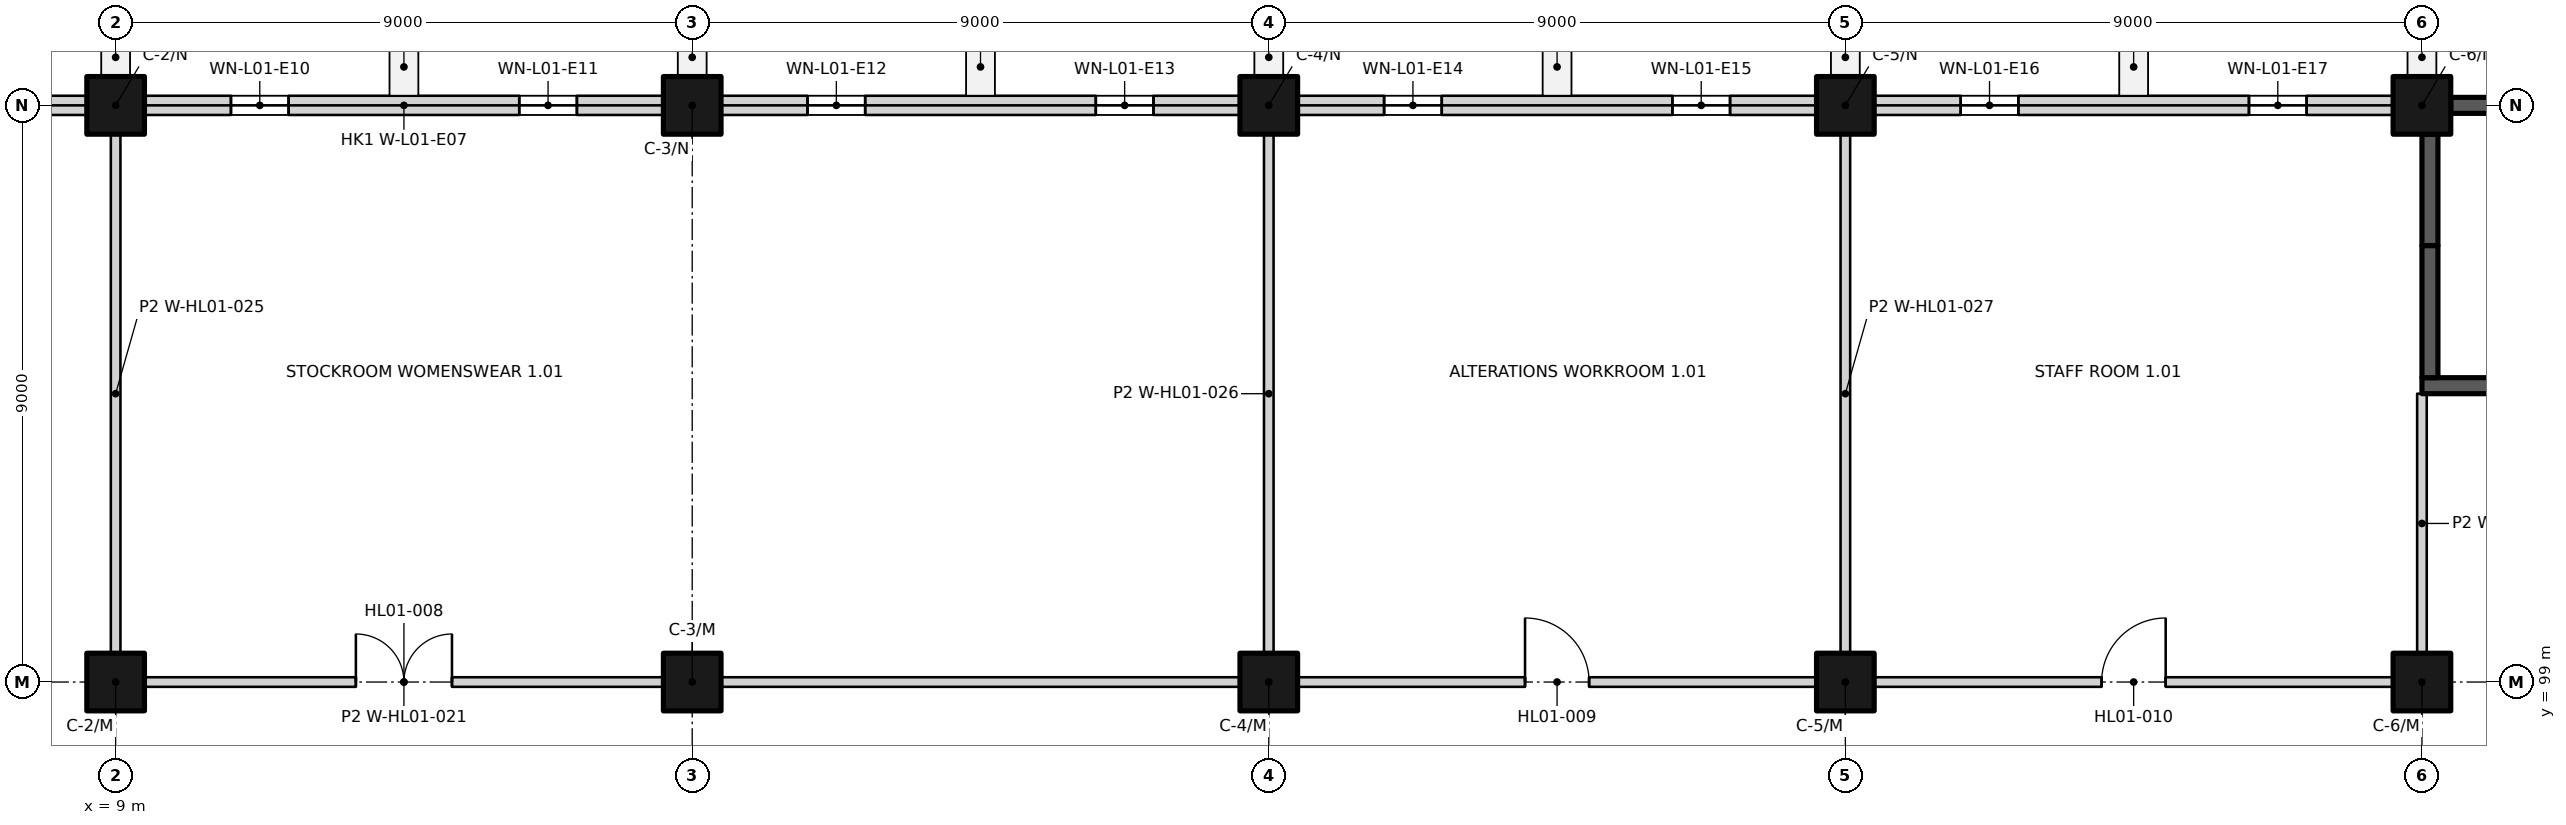
"""IFC4 building model, lengths in metres.
Left out: names, types, materials, properties, quantities, classifications, styles, units other than length and angle.
Written with IfcOpenShell. Run it as: python <this file> out.ifc"""

import sys

from ifc_helpers import new_model, si_unit, direction, frame, frame_2d, origin, origin_2d, place, context, subcontext, project, spatial, rectangle, extrude, element, fill, save


model = new_model("IFC4")
c1 = context("Model", 3, precision=1e-05, world=origin(), true_north=direction((0.0, 1.0)))
c2 = subcontext(c1, "Body", "Model", "MODEL_VIEW")
j1 = project(units=[si_unit("LENGTHUNIT", "METRE"), si_unit("PLANEANGLEUNIT", "RADIAN")], contexts=[c1])
p1 = place(None, origin())
s1 = spatial("IfcSite", under=j1, at=p1, CompositionType="ELEMENT")
p2 = place(p1, origin())
s2 = spatial("IfcBuilding", under=s1, at=p2, CompositionType="ELEMENT")
p3 = place(p2, frame((0.0, 0.0, 6.0)))
s3 = spatial("IfcBuildingStorey", under=s2, at=p3, CompositionType="ELEMENT", Elevation=6.0)
for number, where, z_axis, x_axis in (
    (1, (9.0, 99.0, 0.0), (0.0, 0.0, 1.0), (1.0, 0.0, 0.0)),
    (2, (18.0, 99.0, 0.0), (0.0, 0.0, 1.0), (1.0, 0.0, 0.0)),
    (3, (27.0, 99.0, 0.0), (0.0, 0.0, 1.0), (1.0, 0.0, 0.0)),
    (4, (36.0, 99.0, 0.0), (0.0, 0.0, 1.0), (1.0, 0.0, 0.0)),
    (5, (45.0, 99.0, 0.0), (0.0, 0.0, 1.0), (1.0, 0.0, 0.0)),
    (6, (9.0, 108.0, 0.0), (0.0, 0.0, 1.0), (1.0, 0.0, 0.0)),
    (7, (18.0, 108.0, 0.0), (0.0, 0.0, 1.0), (1.0, 0.0, 0.0)),
    (8, (27.0, 108.0, 0.0), (0.0, 0.0, 1.0), (1.0, 0.0, 0.0)),
    (9, (36.0, 108.0, 0.0), (0.0, 0.0, 1.0), (1.0, 0.0, 0.0)),
    (10, (45.0, 108.0, 0.0), (0.0, 0.0, 1.0), (1.0, 0.0, 0.0)),
):
    element("IfcColumn", number, at=place(p3, frame(where, z_axis=z_axis, x_axis=x_axis)), inside=s3, PredefinedType="COLUMN", context=c2, shape_type="SweptSolid", body=[
        extrude(rectangle(XDim=0.9, YDim=0.9, at=origin_2d()), origin(), (0.0, 0.0, 1.0), 4.5),
    ])
p4 = place(p3, frame((45.0, 103.625, 0.0), z_axis=(0.0, 0.0, 1.0), x_axis=(1.0, 0.0, 0.0)))
e11 = element("IfcWall", 11, at=p4, inside=s3, PredefinedType="SHEAR", context=c2, shape_type="SweptSolid", body=[
    extrude(rectangle(XDim=9.0, YDim=0.25, at=frame_2d((4.5, 0.0))), origin(), (0.0, 0.0, 1.0), 4.5),
])
p5 = place(p3, frame((45.45, 108.0, 0.0), z_axis=(0.0, 0.0, 1.0), x_axis=(1.0, 0.0, 0.0)))
e12 = element("IfcWall", 12, at=p5, inside=s3, PredefinedType="SHEAR", context=c2, shape_type="SweptSolid", body=[
    extrude(rectangle(XDim=8.1, YDim=0.25, at=frame_2d((4.05, 0.0))), origin(), (0.0, 0.0, 1.0), 4.5),
])
p6 = place(p3, frame((45.125, 103.75, 0.0), z_axis=(0.0, 0.0, 1.0), x_axis=(0.0, 1.0, 0.0)))
e13 = element("IfcWall", 13, at=p6, inside=s3, PredefinedType="SHEAR", context=c2, shape_type="SweptSolid", body=[
    extrude(rectangle(XDim=2.062, YDim=0.25, at=frame_2d((1.031, 0.0))), origin(), (0.0, 0.0, 1.0), 4.5),
])
p7 = place(p3, frame((45.125, 105.812, 0.0), z_axis=(0.0, 0.0, 1.0), x_axis=(0.0, 1.0, 0.0)))
e14 = element("IfcWall", 14, at=p7, inside=s3, PredefinedType="SHEAR", context=c2, shape_type="SweptSolid", body=[
    extrude(rectangle(XDim=1.738, YDim=0.25, at=frame_2d((0.869, 0.0))), origin(), (0.0, 0.0, 1.0), 4.5),
])
p8 = place(p3, frame((4.5, 108.0, 0.0), z_axis=(0.0, 0.0, 1.0), x_axis=(1.0, 0.0, 0.0)))
e15 = element("IfcWall", 15, at=p8, inside=s3, PredefinedType="SOLIDWALL", context=c2, shape_type="SweptSolid", body=[
    extrude(rectangle(XDim=4.05, YDim=0.3, at=frame_2d((2.025, 0.0))), origin(), (0.0, 0.0, 1.0), 3.7),
])
p9 = place(p8, frame((1.8, 0.0, 0.45)))
e16 = element("IfcOpeningElement", 16, at=p9, cuts=e15, PredefinedType="OPENING", context=c2, shape_type="SweptSolid", body=[
    extrude(rectangle(XDim=0.9, YDim=3.0, at=frame_2d((0.45, 1.5))), frame((0.0, 0.16, 0.0), z_axis=(0.0, -1.0, 0.0), x_axis=(1.0, 0.0, 0.0)), (0.0, 0.0, 1.0), 0.32),
])
p10 = place(p3, frame((9.45, 108.0, 0.0), z_axis=(0.0, 0.0, 1.0), x_axis=(1.0, 0.0, 0.0)))
e17 = element("IfcWall", 17, at=p10, inside=s3, PredefinedType="SOLIDWALL", context=c2, shape_type="SweptSolid", body=[
    extrude(rectangle(XDim=8.1, YDim=0.3, at=frame_2d((4.05, 0.0))), origin(), (0.0, 0.0, 1.0), 3.7),
])
p11 = place(p10, frame((1.35, 0.0, 0.45)))
e18 = element("IfcOpeningElement", 18, at=p11, cuts=e17, PredefinedType="OPENING", context=c2, shape_type="SweptSolid", body=[
    extrude(rectangle(XDim=0.9, YDim=3.0, at=frame_2d((0.45, 1.5))), frame((0.0, 0.16, 0.0), z_axis=(0.0, -1.0, 0.0), x_axis=(1.0, 0.0, 0.0)), (0.0, 0.0, 1.0), 0.32),
])
p12 = place(p10, frame((5.85, 0.0, 0.45)))
e19 = element("IfcOpeningElement", 19, at=p12, cuts=e17, PredefinedType="OPENING", context=c2, shape_type="SweptSolid", body=[
    extrude(rectangle(XDim=0.9, YDim=3.0, at=frame_2d((0.45, 1.5))), frame((0.0, 0.16, 0.0), z_axis=(0.0, -1.0, 0.0), x_axis=(1.0, 0.0, 0.0)), (0.0, 0.0, 1.0), 0.32),
])
p13 = place(p3, frame((18.45, 108.0, 0.0), z_axis=(0.0, 0.0, 1.0), x_axis=(1.0, 0.0, 0.0)))
e20 = element("IfcWall", 20, at=p13, inside=s3, PredefinedType="SOLIDWALL", context=c2, shape_type="SweptSolid", body=[
    extrude(rectangle(XDim=8.1, YDim=0.3, at=frame_2d((4.05, 0.0))), origin(), (0.0, 0.0, 1.0), 3.7),
])
p14 = place(p13, frame((1.35, 0.0, 0.45)))
e21 = element("IfcOpeningElement", 21, at=p14, cuts=e20, PredefinedType="OPENING", context=c2, shape_type="SweptSolid", body=[
    extrude(rectangle(XDim=0.9, YDim=3.0, at=frame_2d((0.45, 1.5))), frame((0.0, 0.16, 0.0), z_axis=(0.0, -1.0, 0.0), x_axis=(1.0, 0.0, 0.0)), (0.0, 0.0, 1.0), 0.32),
])
p15 = place(p13, frame((5.85, 0.0, 0.45)))
e22 = element("IfcOpeningElement", 22, at=p15, cuts=e20, PredefinedType="OPENING", context=c2, shape_type="SweptSolid", body=[
    extrude(rectangle(XDim=0.9, YDim=3.0, at=frame_2d((0.45, 1.5))), frame((0.0, 0.16, 0.0), z_axis=(0.0, -1.0, 0.0), x_axis=(1.0, 0.0, 0.0)), (0.0, 0.0, 1.0), 0.32),
])
p16 = place(p3, frame((27.45, 108.0, 0.0), z_axis=(0.0, 0.0, 1.0), x_axis=(1.0, 0.0, 0.0)))
e23 = element("IfcWall", 23, at=p16, inside=s3, PredefinedType="SOLIDWALL", context=c2, shape_type="SweptSolid", body=[
    extrude(rectangle(XDim=8.1, YDim=0.3, at=frame_2d((4.05, 0.0))), origin(), (0.0, 0.0, 1.0), 3.7),
])
p17 = place(p16, frame((1.35, 0.0, 0.45)))
e24 = element("IfcOpeningElement", 24, at=p17, cuts=e23, PredefinedType="OPENING", context=c2, shape_type="SweptSolid", body=[
    extrude(rectangle(XDim=0.9, YDim=3.0, at=frame_2d((0.45, 1.5))), frame((0.0, 0.16, 0.0), z_axis=(0.0, -1.0, 0.0), x_axis=(1.0, 0.0, 0.0)), (0.0, 0.0, 1.0), 0.32),
])
p18 = place(p16, frame((5.85, 0.0, 0.45)))
e25 = element("IfcOpeningElement", 25, at=p18, cuts=e23, PredefinedType="OPENING", context=c2, shape_type="SweptSolid", body=[
    extrude(rectangle(XDim=0.9, YDim=3.0, at=frame_2d((0.45, 1.5))), frame((0.0, 0.16, 0.0), z_axis=(0.0, -1.0, 0.0), x_axis=(1.0, 0.0, 0.0)), (0.0, 0.0, 1.0), 0.32),
])
p19 = place(p3, frame((36.45, 108.0, 0.0), z_axis=(0.0, 0.0, 1.0), x_axis=(1.0, 0.0, 0.0)))
e26 = element("IfcWall", 26, at=p19, inside=s3, PredefinedType="SOLIDWALL", context=c2, shape_type="SweptSolid", body=[
    extrude(rectangle(XDim=8.1, YDim=0.3, at=frame_2d((4.05, 0.0))), origin(), (0.0, 0.0, 1.0), 3.7),
])
p20 = place(p19, frame((1.35, 0.0, 0.45)))
e27 = element("IfcOpeningElement", 27, at=p20, cuts=e26, PredefinedType="OPENING", context=c2, shape_type="SweptSolid", body=[
    extrude(rectangle(XDim=0.9, YDim=3.0, at=frame_2d((0.45, 1.5))), frame((0.0, 0.16, 0.0), z_axis=(0.0, -1.0, 0.0), x_axis=(1.0, 0.0, 0.0)), (0.0, 0.0, 1.0), 0.32),
])
p21 = place(p19, frame((5.85, 0.0, 0.45)))
e28 = element("IfcOpeningElement", 28, at=p21, cuts=e26, PredefinedType="OPENING", context=c2, shape_type="SweptSolid", body=[
    extrude(rectangle(XDim=0.9, YDim=3.0, at=frame_2d((0.45, 1.5))), frame((0.0, 0.16, 0.0), z_axis=(0.0, -1.0, 0.0), x_axis=(1.0, 0.0, 0.0)), (0.0, 0.0, 1.0), 0.32),
])
p22 = place(p3, frame((9.45, 99.0, 0.0), z_axis=(0.0, 0.0, 1.0), x_axis=(1.0, 0.0, 0.0)))
e29 = element("IfcWall", 29, at=p22, inside=s3, PredefinedType="PARTITIONING", context=c2, shape_type="SweptSolid", body=[
    extrude(rectangle(XDim=8.1, YDim=0.15, at=frame_2d((4.05, 0.0))), origin(), (0.0, 0.0, 1.0), 4.2),
])
p23 = place(p22, frame((3.3, 0.0, 0.0)))
e30 = element("IfcOpeningElement", 30, at=p23, cuts=e29, PredefinedType="OPENING", context=c2, shape_type="SweptSolid", body=[
    extrude(rectangle(XDim=1.5, YDim=2.1, at=frame_2d((0.75, 1.05))), frame((0.0, 0.085, 0.0), z_axis=(0.0, -1.0, 0.0), x_axis=(1.0, 0.0, 0.0)), (0.0, 0.0, 1.0), 0.17),
])
p24 = place(p3, frame((18.45, 99.0, 0.0), z_axis=(0.0, 0.0, 1.0), x_axis=(1.0, 0.0, 0.0)))
e31 = element("IfcWall", 31, at=p24, inside=s3, PredefinedType="PARTITIONING", context=c2, shape_type="SweptSolid", body=[
    extrude(rectangle(XDim=8.1, YDim=0.15, at=frame_2d((4.05, 0.0))), origin(), (0.0, 0.0, 1.0), 4.2),
])
p25 = place(p3, frame((27.45, 99.0, 0.0), z_axis=(0.0, 0.0, 1.0), x_axis=(1.0, 0.0, 0.0)))
e32 = element("IfcWall", 32, at=p25, inside=s3, PredefinedType="PARTITIONING", context=c2, shape_type="SweptSolid", body=[
    extrude(rectangle(XDim=8.1, YDim=0.15, at=frame_2d((4.05, 0.0))), origin(), (0.0, 0.0, 1.0), 4.2),
])
p26 = place(p25, frame((3.55, 0.0, 0.0)))
e33 = element("IfcOpeningElement", 33, at=p26, cuts=e32, PredefinedType="OPENING", context=c2, shape_type="SweptSolid", body=[
    extrude(rectangle(XDim=1.0, YDim=2.4, at=frame_2d((0.5, 1.2))), frame((0.0, 0.085, 0.0), z_axis=(0.0, -1.0, 0.0), x_axis=(1.0, 0.0, 0.0)), (0.0, 0.0, 1.0), 0.17),
])
p27 = place(p3, frame((36.45, 99.0, 0.0), z_axis=(0.0, 0.0, 1.0), x_axis=(1.0, 0.0, 0.0)))
e34 = element("IfcWall", 34, at=p27, inside=s3, PredefinedType="PARTITIONING", context=c2, shape_type="SweptSolid", body=[
    extrude(rectangle(XDim=8.1, YDim=0.15, at=frame_2d((4.05, 0.0))), origin(), (0.0, 0.0, 1.0), 4.2),
])
p28 = place(p27, frame((3.55, 0.0, 0.0)))
e35 = element("IfcOpeningElement", 35, at=p28, cuts=e34, PredefinedType="OPENING", context=c2, shape_type="SweptSolid", body=[
    extrude(rectangle(XDim=1.0, YDim=2.4, at=frame_2d((0.5, 1.2))), frame((0.0, 0.085, 0.0), z_axis=(0.0, -1.0, 0.0), x_axis=(1.0, 0.0, 0.0)), (0.0, 0.0, 1.0), 0.17),
])
for number, where, z_axis, x_axis in (
    (36, (9.0, 99.45, 0.0), (0.0, 0.0, 1.0), (0.0, 1.0, 0.0)),
    (37, (27.0, 99.45, 0.0), (0.0, 0.0, 1.0), (0.0, 1.0, 0.0)),
    (38, (36.0, 99.45, 0.0), (0.0, 0.0, 1.0), (0.0, 1.0, 0.0)),
):
    element("IfcWall", number, at=place(p3, frame(where, z_axis=z_axis, x_axis=x_axis)), inside=s3, PredefinedType="PARTITIONING", context=c2, shape_type="SweptSolid", body=[
        extrude(rectangle(XDim=8.1, YDim=0.15, at=frame_2d((4.05, 0.0))), origin(), (0.0, 0.0, 1.0), 4.2),
    ])
p29 = place(p3, frame((45.0, 99.45, 0.0), z_axis=(0.0, 0.0, 1.0), x_axis=(0.0, 1.0, 0.0)))
e39 = element("IfcWall", 39, at=p29, inside=s3, PredefinedType="PARTITIONING", context=c2, shape_type="SweptSolid", body=[
    extrude(rectangle(XDim=4.05, YDim=0.15, at=frame_2d((2.025, 0.0))), origin(), (0.0, 0.0, 1.0), 4.2),
])
p30 = place(p11, origin())
e40 = element("IfcWindow", 40, at=p30, inside=s3, PartitioningType="SINGLE_PANEL", PredefinedType="WINDOW", context=c2, shape_type="SweptSolid", body=[
    extrude(rectangle(XDim=0.9, YDim=3.0, at=frame_2d((0.45, 1.5))), frame((0.0, -0.03, 0.0), z_axis=(0.0, -1.0, 0.0), x_axis=(1.0, 0.0, 0.0)), (0.0, 0.0, 1.0), 0.06),
])
fill(e18, e40)
p31 = place(p12, origin())
e41 = element("IfcWindow", 41, at=p31, inside=s3, PartitioningType="SINGLE_PANEL", PredefinedType="WINDOW", context=c2, shape_type="SweptSolid", body=[
    extrude(rectangle(XDim=0.9, YDim=3.0, at=frame_2d((0.45, 1.5))), frame((0.0, -0.03, 0.0), z_axis=(0.0, -1.0, 0.0), x_axis=(1.0, 0.0, 0.0)), (0.0, 0.0, 1.0), 0.06),
])
fill(e19, e41)
p32 = place(p14, origin())
e42 = element("IfcWindow", 42, at=p32, inside=s3, PartitioningType="SINGLE_PANEL", PredefinedType="WINDOW", context=c2, shape_type="SweptSolid", body=[
    extrude(rectangle(XDim=0.9, YDim=3.0, at=frame_2d((0.45, 1.5))), frame((0.0, -0.03, 0.0), z_axis=(0.0, -1.0, 0.0), x_axis=(1.0, 0.0, 0.0)), (0.0, 0.0, 1.0), 0.06),
])
fill(e21, e42)
p33 = place(p15, origin())
e43 = element("IfcWindow", 43, at=p33, inside=s3, PartitioningType="SINGLE_PANEL", PredefinedType="WINDOW", context=c2, shape_type="SweptSolid", body=[
    extrude(rectangle(XDim=0.9, YDim=3.0, at=frame_2d((0.45, 1.5))), frame((0.0, -0.03, 0.0), z_axis=(0.0, -1.0, 0.0), x_axis=(1.0, 0.0, 0.0)), (0.0, 0.0, 1.0), 0.06),
])
fill(e22, e43)
p34 = place(p17, origin())
e44 = element("IfcWindow", 44, at=p34, inside=s3, PartitioningType="SINGLE_PANEL", PredefinedType="WINDOW", context=c2, shape_type="SweptSolid", body=[
    extrude(rectangle(XDim=0.9, YDim=3.0, at=frame_2d((0.45, 1.5))), frame((0.0, -0.03, 0.0), z_axis=(0.0, -1.0, 0.0), x_axis=(1.0, 0.0, 0.0)), (0.0, 0.0, 1.0), 0.06),
])
fill(e24, e44)
p35 = place(p18, origin())
e45 = element("IfcWindow", 45, at=p35, inside=s3, PartitioningType="SINGLE_PANEL", PredefinedType="WINDOW", context=c2, shape_type="SweptSolid", body=[
    extrude(rectangle(XDim=0.9, YDim=3.0, at=frame_2d((0.45, 1.5))), frame((0.0, -0.03, 0.0), z_axis=(0.0, -1.0, 0.0), x_axis=(1.0, 0.0, 0.0)), (0.0, 0.0, 1.0), 0.06),
])
fill(e25, e45)
p36 = place(p20, origin())
e46 = element("IfcWindow", 46, at=p36, inside=s3, PartitioningType="SINGLE_PANEL", PredefinedType="WINDOW", context=c2, shape_type="SweptSolid", body=[
    extrude(rectangle(XDim=0.9, YDim=3.0, at=frame_2d((0.45, 1.5))), frame((0.0, -0.03, 0.0), z_axis=(0.0, -1.0, 0.0), x_axis=(1.0, 0.0, 0.0)), (0.0, 0.0, 1.0), 0.06),
])
fill(e27, e46)
p37 = place(p21, origin())
e47 = element("IfcWindow", 47, at=p37, inside=s3, PartitioningType="SINGLE_PANEL", PredefinedType="WINDOW", context=c2, shape_type="SweptSolid", body=[
    extrude(rectangle(XDim=0.9, YDim=3.0, at=frame_2d((0.45, 1.5))), frame((0.0, -0.03, 0.0), z_axis=(0.0, -1.0, 0.0), x_axis=(1.0, 0.0, 0.0)), (0.0, 0.0, 1.0), 0.06),
])
fill(e28, e47)
p38 = place(p23, origin())
e48 = element("IfcDoor", 48, at=p38, inside=s3, OperationType="DOUBLE_DOOR_SINGLE_SWING", PredefinedType="DOOR", context=c2, shape_type="SweptSolid", body=[
    extrude(rectangle(XDim=1.5, YDim=2.1, at=frame_2d((0.75, 1.05))), frame((0.0, 0.025, 0.0), z_axis=(0.0, -1.0, 0.0), x_axis=(1.0, 0.0, 0.0)), (0.0, 0.0, 1.0), 0.05),
])
fill(e30, e48)
p39 = place(p26, origin())
e49 = element("IfcDoor", 49, at=p39, inside=s3, OperationType="SINGLE_SWING_LEFT", PredefinedType="DOOR", context=c2, shape_type="SweptSolid", body=[
    extrude(rectangle(XDim=1.0, YDim=2.4, at=frame_2d((0.5, 1.2))), frame((0.0, 0.025, 0.0), z_axis=(0.0, -1.0, 0.0), x_axis=(1.0, 0.0, 0.0)), (0.0, 0.0, 1.0), 0.05),
])
fill(e33, e49)
p40 = place(p28, origin())
e50 = element("IfcDoor", 50, at=p40, inside=s3, OperationType="SINGLE_SWING_RIGHT", PredefinedType="DOOR", context=c2, shape_type="SweptSolid", body=[
    extrude(rectangle(XDim=1.0, YDim=2.4, at=frame_2d((0.5, 1.2))), frame((0.0, 0.025, 0.0), z_axis=(0.0, -1.0, 0.0), x_axis=(1.0, 0.0, 0.0)), (0.0, 0.0, 1.0), 0.05),
])
fill(e35, e50)
save(model, sys.argv[1])
